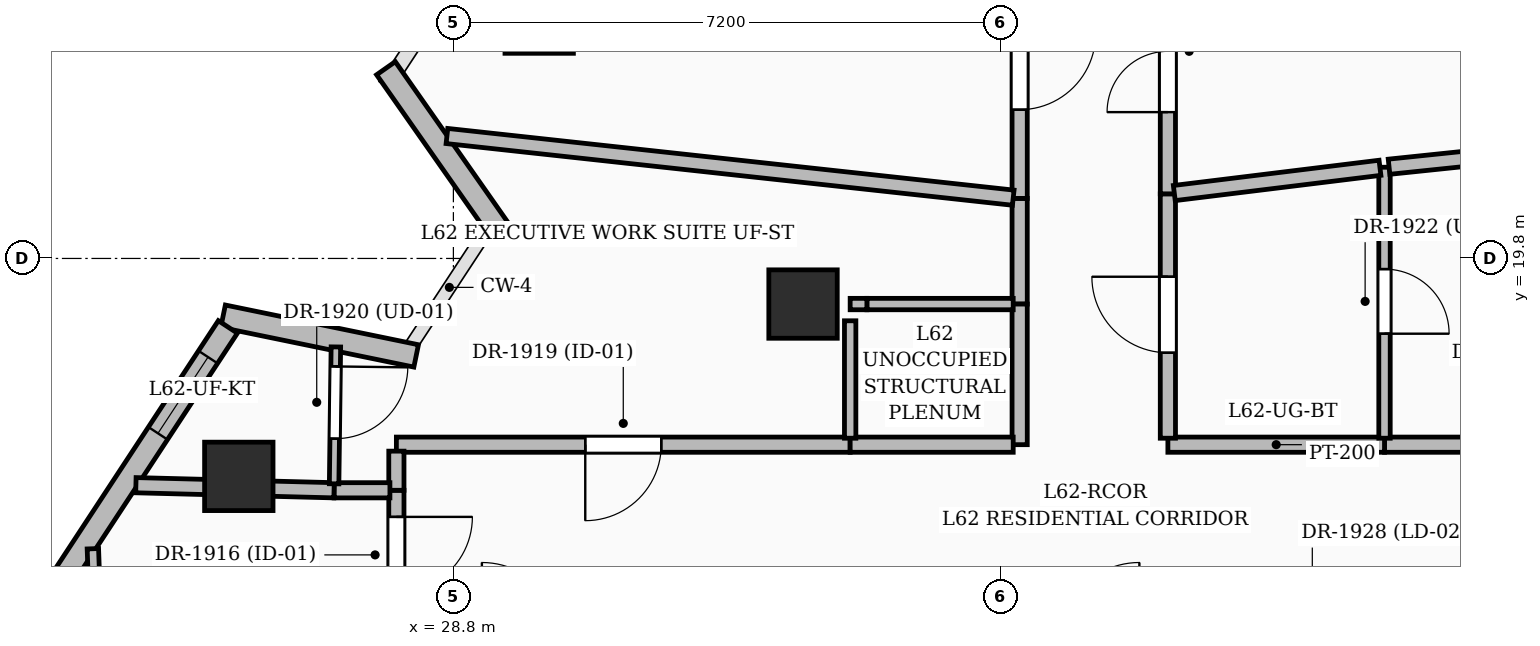
"""IFC4 building model, lengths in metres.
Left out: names, types, materials, properties, quantities, classifications, styles, units other than length and angle.
Written with IfcOpenShell. Run it as: python <this file> out.ifc"""

import sys

from ifc_helpers import new_model, si_unit, direction, frame, frame_2d, origin, origin_2d, place, context, subcontext, project, spatial, rectangle, extrude, element, fill, save


model = new_model("IFC4")
c1 = context("Model", 3, precision=1e-05, world=origin(), true_north=direction((0.0, 1.0)))
c2 = subcontext(c1, "Body", "Model", "MODEL_VIEW")
j1 = project(units=[si_unit("LENGTHUNIT", "METRE"), si_unit("PLANEANGLEUNIT", "RADIAN")], contexts=[c1])
p1 = place(None, origin())
s1 = spatial("IfcSite", under=j1, at=p1, CompositionType="ELEMENT")
p2 = place(p1, origin())
s2 = spatial("IfcBuilding", under=s1, at=p2, CompositionType="ELEMENT")
p3 = place(p2, frame((0.0, 0.0, 240.75)))
s3 = spatial("IfcBuildingStorey", under=s2, at=p3, CompositionType="ELEMENT", Elevation=240.75)
for number, where, z_axis, x_axis in (
    (1, (33.4, 19.2, 0.0), (0.0, 0.0, 1.0), (1.0, 0.0, 0.0)),
    (2, (29.929, 22.949, 0.0), (0.0, 0.0, 1.0), (1.0, 0.0, 0.0)),
    (3, (25.977, 16.933, 0.0), (0.0, 0.0, 1.0), (1.0, 0.0, 0.0)),
):
    element("IfcColumn", number, at=place(p3, frame(where, z_axis=z_axis, x_axis=x_axis)), inside=s3, PredefinedType="COLUMN", context=c2, shape_type="SweptSolid", body=[
        extrude(rectangle(XDim=0.9, YDim=0.9, at=origin_2d()), origin(), (0.0, 0.0, 1.0), 3.75),
    ])
p4 = place(p3, frame((25.77, 19.04, 0.0), z_axis=(0.0, 0.0, 1.0), x_axis=(0.979494216194, -0.20147228207, 0.0)))
e4 = element("IfcWall", 4, at=p4, inside=s3, PredefinedType="SOLIDWALL", context=c2, shape_type="SweptSolid", body=[
    extrude(rectangle(XDim=2.593, YDim=0.3, at=frame_2d((1.297, 0.0))), origin(), (0.0, 0.0, 1.0), 2.825),
])
p5 = place(p3, frame((29.401, 20.178, 0.0), z_axis=(0.0, 0.0, 1.0), x_axis=(-0.573967598523, 0.818878010356, 0.0)))
e5 = element("IfcWall", 5, at=p5, inside=s3, PredefinedType="SOLIDWALL", context=c2, shape_type="SweptSolid", body=[
    extrude(rectangle(XDim=2.594, YDim=0.3, at=frame_2d((1.297, 0.0))), origin(), (0.0, 0.0, 1.0), 2.825),
])
p6 = place(p3, frame((22.896, 14.428, 0.0), z_axis=(0.0, 0.0, 1.0), x_axis=(0.549084999381, 0.835766512523, 0.0)))
e6 = element("IfcWall", 6, at=p6, inside=s3, PredefinedType="SOLIDWALL", context=c2, shape_type="SweptSolid", body=[
    extrude(rectangle(XDim=5.35, YDim=0.3, at=frame_2d((2.675, 0.0))), origin(), (0.0, 0.0, 1.0), 3.5),
])
p7 = place(p6, frame((3.675, 0.0, 0.8)))
e7 = element("IfcOpeningElement", 7, at=p7, cuts=e6, PredefinedType="OPENING", context=c2, shape_type="SweptSolid", body=[
    extrude(rectangle(XDim=1.2, YDim=1.8, at=frame_2d((0.6, 0.9))), frame((0.0, 0.16, 0.0), z_axis=(0.0, -1.0, 0.0), x_axis=(1.0, 0.0, 0.0)), (0.0, 0.0, 1.0), 0.32),
])
p8 = place(p3, frame((28.05, 16.75, 0.0), z_axis=(0.0, 0.0, 1.0), x_axis=(0.0, -1.0, 0.0)))
e8 = element("IfcWall", 8, at=p8, inside=s3, PredefinedType="PARTITIONING", context=c2, shape_type="SweptSolid", body=[
    extrude(rectangle(XDim=1.7, YDim=0.2, at=frame_2d((0.85, 0.0))), origin(), (0.0, 0.0, 1.0), 3.5),
])
p9 = place(p8, frame((0.35, 0.0, 0.0)))
e9 = element("IfcOpeningElement", 9, at=p9, cuts=e8, PredefinedType="OPENING", context=c2, shape_type="SweptSolid", body=[
    extrude(rectangle(XDim=1.0, YDim=2.2, at=frame_2d((0.5, 1.1))), frame((0.0, 0.11, 0.0), z_axis=(0.0, -1.0, 0.0), x_axis=(1.0, 0.0, 0.0)), (0.0, 0.0, 1.0), 0.22),
])
p10 = place(p3, frame((34.02, 17.35, 0.0), z_axis=(0.0, 0.0, 1.0), x_axis=(-1.0, 0.0, 0.0)))
e10 = element("IfcWall", 10, at=p10, inside=s3, PredefinedType="PARTITIONING", context=c2, shape_type="SweptSolid", body=[
    extrude(rectangle(XDim=5.97, YDim=0.2, at=frame_2d((2.985, 0.0))), origin(), (0.0, 0.0, 1.0), 2.685),
])
p11 = place(p10, frame((2.485, 0.0, 0.0)))
e11 = element("IfcOpeningElement", 11, at=p11, cuts=e10, PredefinedType="OPENING", context=c2, shape_type="SweptSolid", body=[
    extrude(rectangle(XDim=1.0, YDim=2.2, at=frame_2d((0.5, 1.1))), frame((0.0, 0.11, 0.0), z_axis=(0.0, -1.0, 0.0), x_axis=(1.0, 0.0, 0.0)), (0.0, 0.0, 1.0), 0.22),
])
p12 = place(p3, frame((28.05, 17.265, 0.0), z_axis=(0.0, 0.0, 1.0), x_axis=(0.0, -1.0, 0.0)))
e12 = element("IfcWall", 12, at=p12, inside=s3, PredefinedType="PARTITIONING", context=c2, shape_type="SweptSolid", body=[
    extrude(rectangle(XDim=0.515, YDim=0.2, at=frame_2d((0.257, 0.0))), origin(), (0.0, 0.0, 1.0), 3.5),
])
p13 = place(p3, frame((36.25, 20.59, 0.0), z_axis=(0.0, 0.0, 1.0), x_axis=(0.0, -1.0, 0.0)))
e13 = element("IfcWall", 13, at=p13, inside=s3, PredefinedType="PARTITIONING", context=c2, shape_type="SweptSolid", body=[
    extrude(rectangle(XDim=1.39, YDim=0.2, at=frame_2d((0.695, 0.0))), origin(), (0.0, 0.0, 1.0), 3.5),
])
p14 = place(p3, frame((36.25, 19.2, 0.0), z_axis=(0.0, 0.0, 1.0), x_axis=(0.0, -1.0, 0.0)))
e14 = element("IfcWall", 14, at=p14, inside=s3, PredefinedType="PARTITIONING", context=c2, shape_type="SweptSolid", body=[
    extrude(rectangle(XDim=1.85, YDim=0.2, at=frame_2d((0.925, 0.0))), origin(), (0.0, 0.0, 1.0), 3.5),
])
p15 = place(p3, frame((36.165, 17.35, 0.0), z_axis=(0.0, 0.0, 1.0), x_axis=(-1.0, 0.0, 0.0)))
e15 = element("IfcWall", 15, at=p15, inside=s3, PredefinedType="PARTITIONING", context=c2, shape_type="SweptSolid", body=[
    extrude(rectangle(XDim=2.145, YDim=0.2, at=frame_2d((1.073, 0.0))), origin(), (0.0, 0.0, 1.0), 2.685),
])
p16 = place(p3, frame((46.715, 17.35, 0.0), z_axis=(0.0, 0.0, 1.0), x_axis=(-1.0, 0.0, 0.0)))
e16 = element("IfcWall", 16, at=p16, inside=s3, PredefinedType="PARTITIONING", context=c2, shape_type="SweptSolid", body=[
    extrude(rectangle(XDim=5.665, YDim=0.2, at=frame_2d((2.833, 0.0))), origin(), (0.0, 0.0, 1.0), 2.685),
])
p17 = place(p16, frame((2.29, 0.0, 0.0)))
e17 = element("IfcOpeningElement", 17, at=p17, cuts=e16, PredefinedType="OPENING", context=c2, shape_type="SweptSolid", body=[
    extrude(rectangle(XDim=1.0, YDim=2.2, at=frame_2d((0.5, 1.1))), frame((0.0, 0.11, 0.0), z_axis=(0.0, -1.0, 0.0), x_axis=(1.0, 0.0, 0.0)), (0.0, 0.0, 1.0), 0.22),
])
p18 = place(p3, frame((41.05, 17.35, 0.0), z_axis=(0.0, 0.0, 1.0), x_axis=(-1.0, 0.0, 0.0)))
e18 = element("IfcWall", 18, at=p18, inside=s3, PredefinedType="PARTITIONING", context=c2, shape_type="SweptSolid", body=[
    extrude(rectangle(XDim=2.85, YDim=0.2, at=frame_2d((1.425, 0.0))), origin(), (0.0, 0.0, 1.0), 3.5),
])
p19 = place(p3, frame((38.2, 17.435, 0.0), z_axis=(0.0, 0.0, 1.0), x_axis=(0.0, 1.0, 0.0)))
e19 = element("IfcWall", 19, at=p19, inside=s3, PredefinedType="PARTITIONING", context=c2, shape_type="SweptSolid", body=[
    extrude(rectangle(XDim=3.215, YDim=0.2, at=frame_2d((1.607, 0.0))), origin(), (0.0, 0.0, 1.0), 3.5),
])
p20 = place(p19, frame((1.125, 0.0, 0.0)))
e20 = element("IfcOpeningElement", 20, at=p20, cuts=e19, PredefinedType="OPENING", context=c2, shape_type="SweptSolid", body=[
    extrude(rectangle(XDim=1.0, YDim=2.2, at=frame_2d((0.5, 1.1))), frame((0.0, 0.11, 0.0), z_axis=(0.0, -1.0, 0.0), x_axis=(1.0, 0.0, 0.0)), (0.0, 0.0, 1.0), 0.22),
])
p21 = place(p3, frame((36.25, 23.81, 0.0), z_axis=(0.0, 0.0, 1.0), x_axis=(0.0, -1.0, 0.0)))
e21 = element("IfcWall", 21, at=p21, inside=s3, PredefinedType="PARTITIONING", context=c2, shape_type="SweptSolid", body=[
    extrude(rectangle(XDim=3.22, YDim=0.2, at=frame_2d((1.61, 0.0))), origin(), (0.0, 0.0, 1.0), 2.685),
])
p22 = place(p21, frame((1.053, 0.0, 0.0)))
e22 = element("IfcOpeningElement", 22, at=p22, cuts=e21, PredefinedType="OPENING", context=c2, shape_type="SweptSolid", body=[
    extrude(rectangle(XDim=1.0, YDim=2.2, at=frame_2d((0.5, 1.1))), frame((0.0, 0.11, 0.0), z_axis=(0.0, -1.0, 0.0), x_axis=(1.0, 0.0, 0.0)), (0.0, 0.0, 1.0), 0.22),
])
p23 = place(p3, frame((38.2, 20.65, 0.0), z_axis=(0.0, 0.0, 1.0), x_axis=(0.0, 1.0, 0.0)))
e23 = element("IfcWall", 23, at=p23, inside=s3, PredefinedType="PARTITIONING", context=c2, shape_type="SweptSolid", body=[
    extrude(rectangle(XDim=3.75, YDim=0.2, at=frame_2d((1.875, 0.0))), origin(), (0.0, 0.0, 1.0), 3.5),
])
p24 = place(p23, frame((1.075, 0.0, 0.0)))
e24 = element("IfcOpeningElement", 24, at=p24, cuts=e23, PredefinedType="OPENING", context=c2, shape_type="SweptSolid", body=[
    extrude(rectangle(XDim=1.6, YDim=2.3, at=frame_2d((0.8, 1.15))), frame((0.0, 0.11, 0.0), z_axis=(0.0, -1.0, 0.0), x_axis=(1.0, 0.0, 0.0)), (0.0, 0.0, 1.0), 0.22),
])
p25 = place(p3, frame((24.057, 15.981, 0.0), z_axis=(0.0, 0.0, 1.0), x_axis=(0.035737055387, -0.999361227421, 0.0)))
e25 = element("IfcWall", 25, at=p25, inside=s3, PredefinedType="PARTITIONING", context=c2, shape_type="SweptSolid", body=[
    extrude(rectangle(XDim=3.443, YDim=0.15, at=frame_2d((1.722, 0.0))), origin(), (0.0, 0.0, 1.0), 2.82),
])
p26 = place(p25, frame((1.3, 0.0, 0.0)))
e26 = element("IfcOpeningElement", 26, at=p26, cuts=e25, PredefinedType="OPENING", context=c2, shape_type="SweptSolid", body=[
    extrude(rectangle(XDim=0.85, YDim=2.1, at=frame_2d((0.425, 1.05))), frame((0.0, 0.085, 0.0), z_axis=(0.0, -1.0, 0.0), x_axis=(1.0, 0.0, 0.0)), (0.0, 0.0, 1.0), 0.17),
])
p27 = place(p3, frame((27.965, 16.75, 0.0), z_axis=(0.0, 0.0, 1.0), x_axis=(-1.0, 0.0, 0.0)))
e27 = element("IfcWall", 27, at=p27, inside=s3, PredefinedType="PARTITIONING", context=c2, shape_type="SweptSolid", body=[
    extrude(rectangle(XDim=0.735, YDim=0.2, at=frame_2d((0.368, 0.0))), origin(), (0.0, 0.0, 1.0), 3.5),
])
p28 = place(p3, frame((27.23, 16.75, 0.0), z_axis=(0.0, 0.0, 1.0), x_axis=(-0.999670938638, 0.025651792207, 0.0)))
e28 = element("IfcWall", 28, at=p28, inside=s3, PredefinedType="PARTITIONING", context=c2, shape_type="SweptSolid", body=[
    extrude(rectangle(XDim=2.608, YDim=0.2, at=frame_2d((1.304, 0.0))), origin(), (0.0, 0.0, 1.0), 3.5),
])
p29 = place(p3, frame((27.254, 18.636, 0.0), z_axis=(0.0, 0.0, 1.0), x_axis=(-0.012876795935, -0.999917090626, 0.0)))
e29 = element("IfcWall", 29, at=p29, inside=s3, PredefinedType="PARTITIONING", context=c2, shape_type="SweptSolid", body=[
    extrude(rectangle(XDim=1.801, YDim=0.125, at=frame_2d((0.901, 0.0))), origin(), (0.0, 0.0, 1.0), 2.82),
])
p30 = place(p29, frame((0.257, 0.0, 0.0)))
e30 = element("IfcOpeningElement", 30, at=p30, cuts=e29, PredefinedType="OPENING", context=c2, shape_type="SweptSolid", body=[
    extrude(rectangle(XDim=0.95, YDim=2.2, at=frame_2d((0.475, 1.1))), frame((0.0, 0.072, 0.0), z_axis=(0.0, -1.0, 0.0), x_axis=(1.0, 0.0, 0.0)), (0.0, 0.0, 1.0), 0.145),
])
p31 = place(p3, frame((34.02, 17.435, 0.0), z_axis=(0.0, 0.0, 1.0), x_axis=(0.0, 1.0, 0.0)))
e31 = element("IfcWall", 31, at=p31, inside=s3, PredefinedType="PARTITIONING", context=c2, shape_type="SweptSolid", body=[
    extrude(rectangle(XDim=1.545, YDim=0.15, at=frame_2d((0.772, 0.0))), origin(), (0.0, 0.0, 1.0), 2.685),
])
p32 = place(p3, frame((34.24, 19.2, 0.0), z_axis=(0.0, 0.0, 1.0), x_axis=(1.0, 0.0, 0.0)))
e32 = element("IfcWall", 32, at=p32, inside=s3, PredefinedType="PARTITIONING", context=c2, shape_type="SweptSolid", body=[
    extrude(rectangle(XDim=1.925, YDim=0.15, at=frame_2d((0.962, 0.0))), origin(), (0.0, 0.0, 1.0), 3.5),
])
p33 = place(p3, frame((41.05, 21.0, 0.0), z_axis=(0.0, 0.0, 1.0), x_axis=(0.0, -1.0, 0.0)))
e33 = element("IfcWall", 33, at=p33, inside=s3, PredefinedType="PARTITIONING", context=c2, shape_type="SweptSolid", body=[
    extrude(rectangle(XDim=3.565, YDim=0.15, at=frame_2d((1.782, 0.0))), origin(), (0.0, 0.0, 1.0), 3.5),
])
p34 = place(p33, frame((1.34, 0.0, 0.0)))
e34 = element("IfcOpeningElement", 34, at=p34, cuts=e33, PredefinedType="OPENING", context=c2, shape_type="SweptSolid", body=[
    extrude(rectangle(XDim=0.85, YDim=2.1, at=frame_2d((0.425, 1.05))), frame((0.0, 0.085, 0.0), z_axis=(0.0, -1.0, 0.0), x_axis=(1.0, 0.0, 0.0)), (0.0, 0.0, 1.0), 0.17),
])
p35 = place(p3, frame((47.243, 21.646, 0.0), z_axis=(0.0, 0.0, 1.0), x_axis=(-0.994609735806, -0.10368931208, 0.0)))
e35 = element("IfcWall", 35, at=p35, inside=s3, PredefinedType="PARTITIONING", context=c2, shape_type="SweptSolid", body=[
    extrude(rectangle(XDim=6.167, YDim=0.2, at=frame_2d((3.083, 0.0))), origin(), (0.0, 0.0, 1.0), 2.685),
])
p36 = place(p3, frame((40.99, 20.993, 0.0), z_axis=(0.0, 0.0, 1.0), x_axis=(-0.992545545842, -0.121874277146, 0.0)))
e36 = element("IfcWall", 36, at=p36, inside=s3, PredefinedType="PARTITIONING", context=c2, shape_type="SweptSolid", body=[
    extrude(rectangle(XDim=2.726, YDim=0.2, at=frame_2d((1.363, 0.0))), origin(), (0.0, 0.0, 1.0), 3.5),
])
p37 = place(p3, frame((36.166, 20.6, 0.0), z_axis=(0.0, 0.0, 1.0), x_axis=(-0.994123675756, 0.108250253122, 0.0)))
e37 = element("IfcWall", 37, at=p37, inside=s3, PredefinedType="PARTITIONING", context=c2, shape_type="SweptSolid", body=[
    extrude(rectangle(XDim=7.494, YDim=0.2, at=frame_2d((3.747, 0.0))), origin(), (0.0, 0.0, 1.0), 2.685),
])
p38 = place(p3, frame((34.24, 19.2, 0.0), z_axis=(0.0, 0.0, 1.0), x_axis=(-1.0, 0.0, 0.0)))
e38 = element("IfcWall", 38, at=p38, inside=s3, PredefinedType="PARTITIONING", context=c2, shape_type="SweptSolid", body=[
    extrude(rectangle(XDim=0.22, YDim=0.15, at=frame_2d((0.11, 0.0))), origin(), (0.0, 0.0, 1.0), 3.5),
])
p39 = place(p7, origin())
e39 = element("IfcWindow", 39, at=p39, inside=s3, PartitioningType="SINGLE_PANEL", PredefinedType="WINDOW", context=c2, shape_type="SweptSolid", body=[
    extrude(rectangle(XDim=1.2, YDim=1.8, at=frame_2d((0.6, 0.9))), frame((0.0, 0.03, 0.0), z_axis=(0.0, -1.0, 0.0), x_axis=(1.0, 0.0, 0.0)), (0.0, 0.0, 1.0), 0.06),
])
fill(e7, e39)
p40 = place(p24, origin())
e40 = element("IfcDoor", 40, at=p40, inside=s3, OperationType="DOUBLE_DOOR_SINGLE_SWING", PredefinedType="DOOR", context=c2, shape_type="SweptSolid", body=[
    extrude(rectangle(XDim=1.6, YDim=2.3, at=frame_2d((0.8, 1.15))), frame((0.0, 0.025, 0.0), z_axis=(0.0, -1.0, 0.0), x_axis=(1.0, 0.0, 0.0)), (0.0, 0.0, 1.0), 0.05),
])
fill(e24, e40)
p41 = place(p9, origin())
e41 = element("IfcDoor", 41, at=p41, inside=s3, OperationType="SINGLE_SWING_LEFT", PredefinedType="DOOR", context=c2, shape_type="SweptSolid", body=[
    extrude(rectangle(XDim=1.0, YDim=2.2, at=frame_2d((0.5, 1.1))), frame((0.0, 0.025, 0.0), z_axis=(0.0, -1.0, 0.0), x_axis=(1.0, 0.0, 0.0)), (0.0, 0.0, 1.0), 0.05),
])
fill(e9, e41)
p42 = place(p11, origin())
e42 = element("IfcDoor", 42, at=p42, inside=s3, OperationType="SINGLE_SWING_RIGHT", PredefinedType="DOOR", context=c2, shape_type="SweptSolid", body=[
    extrude(rectangle(XDim=1.0, YDim=2.2, at=frame_2d((0.5, 1.1))), frame((0.0, 0.025, 0.0), z_axis=(0.0, -1.0, 0.0), x_axis=(1.0, 0.0, 0.0)), (0.0, 0.0, 1.0), 0.05),
])
fill(e11, e42)
p43 = place(p30, origin())
e43 = element("IfcDoor", 43, at=p43, inside=s3, OperationType="SINGLE_SWING_LEFT", PredefinedType="DOOR", context=c2, shape_type="SweptSolid", body=[
    extrude(rectangle(XDim=0.95, YDim=2.2, at=frame_2d((0.475, 1.1))), frame((0.0, 0.025, 0.0), z_axis=(0.0, -1.0, 0.0), x_axis=(1.0, 0.0, 0.0)), (0.0, 0.0, 1.0), 0.05),
])
fill(e30, e43)
p44 = place(p34, origin())
e44 = element("IfcDoor", 44, at=p44, inside=s3, OperationType="SINGLE_SWING_RIGHT", PredefinedType="DOOR", context=c2, shape_type="SweptSolid", body=[
    extrude(rectangle(XDim=0.85, YDim=2.1, at=frame_2d((0.425, 1.05))), frame((0.0, 0.025, 0.0), z_axis=(0.0, -1.0, 0.0), x_axis=(1.0, 0.0, 0.0)), (0.0, 0.0, 1.0), 0.05),
])
fill(e34, e44)
p45 = place(p22, origin())
e45 = element("IfcDoor", 45, at=p45, inside=s3, OperationType="SINGLE_SWING_LEFT", PredefinedType="DOOR", context=c2, shape_type="SweptSolid", body=[
    extrude(rectangle(XDim=1.0, YDim=2.2, at=frame_2d((0.5, 1.1))), frame((0.0, 0.025, 0.0), z_axis=(0.0, -1.0, 0.0), x_axis=(1.0, 0.0, 0.0)), (0.0, 0.0, 1.0), 0.05),
])
fill(e22, e45)
p46 = place(p20, origin())
e46 = element("IfcDoor", 46, at=p46, inside=s3, OperationType="SINGLE_SWING_RIGHT", PredefinedType="DOOR", context=c2, shape_type="SweptSolid", body=[
    extrude(rectangle(XDim=1.0, YDim=2.2, at=frame_2d((0.5, 1.1))), frame((0.0, 0.025, 0.0), z_axis=(0.0, -1.0, 0.0), x_axis=(1.0, 0.0, 0.0)), (0.0, 0.0, 1.0), 0.05),
])
fill(e20, e46)
save(model, sys.argv[1])
